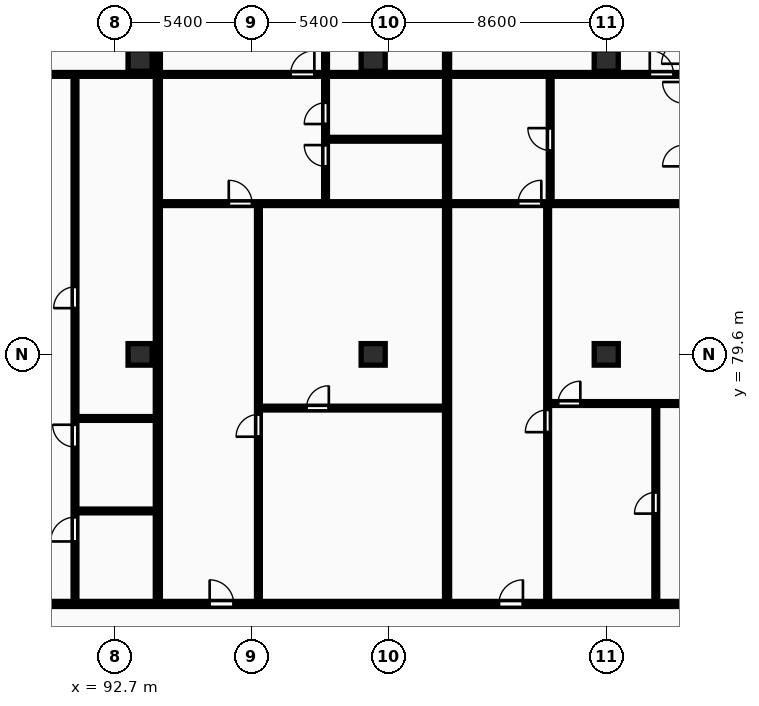
"""IFC4 building model, lengths in metres.
Left out: names, types, materials, properties, quantities, classifications, styles, units other than length and angle.
Written with IfcOpenShell. Run it as: python <this file> out.ifc"""

import sys

from ifc_helpers import new_model, si_unit, direction, frame, frame_2d, origin, origin_2d, place, context, subcontext, project, spatial, rectangle, extrude, element, fill, save


model = new_model("IFC4")
c1 = context("Model", 3, precision=1e-05, world=origin(), true_north=direction((0.0, 1.0)))
c2 = subcontext(c1, "Body", "Model", "MODEL_VIEW")
j1 = project(units=[si_unit("LENGTHUNIT", "METRE"), si_unit("PLANEANGLEUNIT", "RADIAN")], contexts=[c1])
p1 = place(None, origin())
s1 = spatial("IfcSite", under=j1, at=p1, CompositionType="ELEMENT")
p2 = place(p1, origin())
s2 = spatial("IfcBuilding", under=s1, at=p2, CompositionType="ELEMENT")
p3 = place(p2, frame((0.0, 0.0, 113.3)))
s3 = spatial("IfcBuildingStorey", under=s2, at=p3, CompositionType="ELEMENT", Elevation=113.3)
for number, where, z_axis, x_axis in (
    (1, (93.7, 79.6, 0.0), (0.0, 0.0, 1.0), (1.0, 0.0, 0.0)),
    (2, (93.7, 91.2, 0.0), (0.0, 0.0, 1.0), (1.0, 0.0, 0.0)),
    (3, (102.9, 79.6, 0.0), (0.0, 0.0, 1.0), (1.0, 0.0, 0.0)),
    (4, (102.9, 91.2, 0.0), (0.0, 0.0, 1.0), (1.0, 0.0, 0.0)),
    (5, (112.1, 79.6, 0.0), (0.0, 0.0, 1.0), (1.0, 0.0, 0.0)),
    (6, (112.1, 91.2, 0.0), (0.0, 0.0, 1.0), (1.0, 0.0, 0.0)),
):
    element("IfcColumn", number, at=place(p3, frame(where, z_axis=z_axis, x_axis=x_axis)), inside=s3, PredefinedType="COLUMN", context=c2, shape_type="SweptSolid", body=[
        extrude(rectangle(XDim=0.95, YDim=0.85, at=origin_2d()), origin(), (0.0, 0.0, 1.0), 3.25),
    ])
p4 = place(p3, frame((94.401, 69.83, 0.0), z_axis=(0.0, 0.0, 1.0), x_axis=(0.0, 1.0, 0.0)))
e7 = element("IfcWall", 7, at=p4, inside=s3, PredefinedType="PARTITIONING", context=c2, shape_type="SweptSolid", body=[
    extrude(rectangle(XDim=26.07, YDim=0.2, at=frame_2d((13.035, 0.0))), origin(), (0.0, 0.0, 1.0), 2.97),
])
for number, where, z_axis, x_axis in (
    (8, (91.191, 73.42, 0.0), (0.0, 0.0, 1.0), (1.0, 0.0, 0.0)),
    (9, (91.191, 77.07, 0.0), (0.0, 0.0, 1.0), (1.0, 0.0, 0.0)),
):
    element("IfcWall", number, at=place(p3, frame(where, z_axis=z_axis, x_axis=x_axis)), inside=s3, PredefinedType="PARTITIONING", context=c2, shape_type="SweptSolid", body=[
        extrude(rectangle(XDim=3.13, YDim=0.15, at=frame_2d((1.565, 0.0))), origin(), (0.0, 0.0, 1.0), 2.97),
    ])
p5 = place(p3, frame((91.131, 69.81, 0.0), z_axis=(0.0, 0.0, 1.0), x_axis=(0.0, 1.0, 0.0)))
e10 = element("IfcWall", 10, at=p5, inside=s3, PredefinedType="PARTITIONING", context=c2, shape_type="SweptSolid", body=[
    extrude(rectangle(XDim=20.78, YDim=0.15, at=frame_2d((10.39, 0.0))), origin(), (0.0, 0.0, 1.0), 2.97),
])
p6 = place(p5, frame((2.406, 0.0, 0.0)))
e11 = element("IfcOpeningElement", 11, at=p6, cuts=e10, PredefinedType="OPENING", context=c2, shape_type="SweptSolid", body=[
    extrude(rectangle(XDim=0.96, YDim=2.1, at=frame_2d((0.48, 1.05))), frame((0.0, 0.085, 0.0), z_axis=(0.0, -1.0, 0.0), x_axis=(1.0, 0.0, 0.0)), (0.0, 0.0, 1.0), 0.17),
])
p7 = place(p5, frame((6.133, 0.0, 0.0)))
e12 = element("IfcOpeningElement", 12, at=p7, cuts=e10, PredefinedType="OPENING", context=c2, shape_type="SweptSolid", body=[
    extrude(rectangle(XDim=0.88, YDim=2.06, at=frame_2d((0.44, 1.03))), frame((0.0, 0.085, 0.0), z_axis=(0.0, -1.0, 0.0), x_axis=(1.0, 0.0, 0.0)), (0.0, 0.0, 1.0), 0.17),
])
p8 = place(p5, frame((11.615, 0.0, 0.0)))
e13 = element("IfcOpeningElement", 13, at=p8, cuts=e10, PredefinedType="OPENING", context=c2, shape_type="SweptSolid", body=[
    extrude(rectangle(XDim=0.84, YDim=2.04, at=frame_2d((0.42, 1.02))), frame((0.0, 0.085, 0.0), z_axis=(0.0, -1.0, 0.0), x_axis=(1.0, 0.0, 0.0)), (0.0, 0.0, 1.0), 0.17),
])
p9 = place(p3, frame((75.405, 90.65, 0.0), z_axis=(0.0, 0.0, 1.0), x_axis=(1.0, 0.0, 0.0)))
e14 = element("IfcWall", 14, at=p9, inside=s3, PredefinedType="PARTITIONING", context=c2, shape_type="SweptSolid", body=[
    extrude(rectangle(XDim=18.916, YDim=0.15, at=frame_2d((9.458, 0.0))), origin(), (0.0, 0.0, 1.0), 2.97),
])
p10 = place(p9, frame((6.426, 0.0, 0.0)))
e15 = element("IfcOpeningElement", 15, at=p10, cuts=e14, PredefinedType="OPENING", context=c2, shape_type="SweptSolid", body=[
    extrude(rectangle(XDim=0.94, YDim=2.1, at=frame_2d((0.47, 1.05))), frame((0.0, 0.085, 0.0), z_axis=(0.0, -1.0, 0.0), x_axis=(1.0, 0.0, 0.0)), (0.0, 0.0, 1.0), 0.17),
])
p11 = place(p9, frame((10.856, 0.0, 0.0)))
e16 = element("IfcOpeningElement", 16, at=p11, cuts=e14, PredefinedType="OPENING", context=c2, shape_type="SweptSolid", body=[
    extrude(rectangle(XDim=0.94, YDim=2.1, at=frame_2d((0.47, 1.05))), frame((0.0, 0.085, 0.0), z_axis=(0.0, -1.0, 0.0), x_axis=(1.0, 0.0, 0.0)), (0.0, 0.0, 1.0), 0.17),
])
p12 = place(p3, frame((105.817, 69.83, 0.0), z_axis=(0.0, 0.0, 1.0), x_axis=(0.0, 1.0, 0.0)))
e17 = element("IfcWall", 17, at=p12, inside=s3, PredefinedType="PARTITIONING", context=c2, shape_type="SweptSolid", body=[
    extrude(rectangle(XDim=26.07, YDim=0.2, at=frame_2d((13.035, 0.0))), origin(), (0.0, 0.0, 1.0), 2.97),
])
p13 = place(p3, frame((98.431, 77.48, 0.0), z_axis=(0.0, 0.0, 1.0), x_axis=(1.0, 0.0, 0.0)))
e18 = element("IfcWall", 18, at=p13, inside=s3, PredefinedType="PARTITIONING", context=c2, shape_type="SweptSolid", body=[
    extrude(rectangle(XDim=7.306, YDim=0.15, at=frame_2d((3.653, 0.0))), origin(), (0.0, 0.0, 1.0), 2.97),
])
p14 = place(p13, frame((1.839, 0.0, 0.0)))
e19 = element("IfcOpeningElement", 19, at=p14, cuts=e18, PredefinedType="OPENING", context=c2, shape_type="SweptSolid", body=[
    extrude(rectangle(XDim=0.88, YDim=2.06, at=frame_2d((0.44, 1.03))), frame((0.0, 0.085, 0.0), z_axis=(0.0, -1.0, 0.0), x_axis=(1.0, 0.0, 0.0)), (0.0, 0.0, 1.0), 0.17),
])
p15 = place(p3, frame((98.371, 69.81, 0.0), z_axis=(0.0, 0.0, 1.0), x_axis=(0.0, 1.0, 0.0)))
e20 = element("IfcWall", 20, at=p15, inside=s3, PredefinedType="PARTITIONING", context=c2, shape_type="SweptSolid", body=[
    extrude(rectangle(XDim=15.7, YDim=0.15, at=frame_2d((7.85, 0.0))), origin(), (0.0, 0.0, 1.0), 2.97),
])
p16 = place(p15, frame((6.54, 0.0, 0.0)))
e21 = element("IfcOpeningElement", 21, at=p16, cuts=e20, PredefinedType="OPENING", context=c2, shape_type="SweptSolid", body=[
    extrude(rectangle(XDim=0.88, YDim=2.06, at=frame_2d((0.44, 1.03))), frame((0.0, 0.085, 0.0), z_axis=(0.0, -1.0, 0.0), x_axis=(1.0, 0.0, 0.0)), (0.0, 0.0, 1.0), 0.17),
])
p17 = place(p3, frame((101.08, 88.09, 0.0), z_axis=(0.0, 0.0, 1.0), x_axis=(1.0, 0.0, 0.0)))
e22 = element("IfcWall", 22, at=p17, inside=s3, PredefinedType="PARTITIONING", context=c2, shape_type="SweptSolid", body=[
    extrude(rectangle(XDim=4.656, YDim=0.15, at=frame_2d((2.328, 0.0))), origin(), (0.0, 0.0, 1.0), 2.97),
])
p18 = place(p3, frame((101.02, 85.59, 0.0), z_axis=(0.0, 0.0, 1.0), x_axis=(0.0, 1.0, 0.0)))
e23 = element("IfcWall", 23, at=p18, inside=s3, PredefinedType="PARTITIONING", context=c2, shape_type="SweptSolid", body=[
    extrude(rectangle(XDim=10.31, YDim=0.15, at=frame_2d((5.155, 0.0))), origin(), (0.0, 0.0, 1.0), 2.97),
])
p19 = place(p18, frame((1.43, 0.0, 0.0)))
e24 = element("IfcOpeningElement", 24, at=p19, cuts=e23, PredefinedType="OPENING", context=c2, shape_type="SweptSolid", body=[
    extrude(rectangle(XDim=0.84, YDim=2.04, at=frame_2d((0.42, 1.02))), frame((0.0, 0.085, 0.0), z_axis=(0.0, -1.0, 0.0), x_axis=(1.0, 0.0, 0.0)), (0.0, 0.0, 1.0), 0.17),
])
p20 = place(p18, frame((3.102, 0.0, 0.0)))
e25 = element("IfcOpeningElement", 25, at=p20, cuts=e23, PredefinedType="OPENING", context=c2, shape_type="SweptSolid", body=[
    extrude(rectangle(XDim=0.84, YDim=2.04, at=frame_2d((0.42, 1.02))), frame((0.0, 0.085, 0.0), z_axis=(0.0, -1.0, 0.0), x_axis=(1.0, 0.0, 0.0)), (0.0, 0.0, 1.0), 0.17),
])
p21 = place(p18, frame((7.29, 0.0, 0.0)))
e26 = element("IfcOpeningElement", 26, at=p21, cuts=e23, PredefinedType="OPENING", context=c2, shape_type="SweptSolid", body=[
    extrude(rectangle(XDim=0.88, YDim=2.06, at=frame_2d((0.44, 1.03))), frame((0.0, 0.085, 0.0), z_axis=(0.0, -1.0, 0.0), x_axis=(1.0, 0.0, 0.0)), (0.0, 0.0, 1.0), 0.17),
])
p22 = place(p3, frame((94.481, 85.55, 0.0), z_axis=(0.0, 0.0, 1.0), x_axis=(1.0, 0.0, 0.0)))
e27 = element("IfcWall", 27, at=p22, inside=s3, PredefinedType="PARTITIONING", context=c2, shape_type="SweptSolid", body=[
    extrude(rectangle(XDim=11.256, YDim=0.15, at=frame_2d((5.628, 0.0))), origin(), (0.0, 0.0, 1.0), 2.97),
])
p23 = place(p22, frame((2.72, 0.0, 0.0)))
e28 = element("IfcOpeningElement", 28, at=p23, cuts=e27, PredefinedType="OPENING", context=c2, shape_type="SweptSolid", body=[
    extrude(rectangle(XDim=0.92, YDim=2.08, at=frame_2d((0.46, 1.04))), frame((0.0, 0.085, 0.0), z_axis=(0.0, -1.0, 0.0), x_axis=(1.0, 0.0, 0.0)), (0.0, 0.0, 1.0), 0.17),
])
p24 = place(p3, frame((94.481, 90.65, 0.0), z_axis=(0.0, 0.0, 1.0), x_axis=(1.0, 0.0, 0.0)))
e29 = element("IfcWall", 29, at=p24, inside=s3, PredefinedType="PARTITIONING", context=c2, shape_type="SweptSolid", body=[
    extrude(rectangle(XDim=11.256, YDim=0.15, at=frame_2d((5.628, 0.0))), origin(), (0.0, 0.0, 1.0), 2.97),
])
p25 = place(p24, frame((5.158, 0.0, 0.0)))
e30 = element("IfcOpeningElement", 30, at=p25, cuts=e29, PredefinedType="OPENING", context=c2, shape_type="SweptSolid", body=[
    extrude(rectangle(XDim=0.94, YDim=2.1, at=frame_2d((0.47, 1.05))), frame((0.0, 0.085, 0.0), z_axis=(0.0, -1.0, 0.0), x_axis=(1.0, 0.0, 0.0)), (0.0, 0.0, 1.0), 0.17),
])
p26 = place(p3, frame((114.055, 69.81, 0.0), z_axis=(0.0, 0.0, 1.0), x_axis=(0.0, 1.0, 0.0)))
e31 = element("IfcWall", 31, at=p26, inside=s3, PredefinedType="PARTITIONING", context=c2, shape_type="SweptSolid", body=[
    extrude(rectangle(XDim=7.85, YDim=0.15, at=frame_2d((3.925, 0.0))), origin(), (0.0, 0.0, 1.0), 2.97),
])
p27 = place(p26, frame((3.505, 0.0, 0.0)))
e32 = element("IfcOpeningElement", 32, at=p27, cuts=e31, PredefinedType="OPENING", context=c2, shape_type="SweptSolid", body=[
    extrude(rectangle(XDim=0.84, YDim=2.04, at=frame_2d((0.42, 1.02))), frame((0.0, 0.085, 0.0), z_axis=(0.0, -1.0, 0.0), x_axis=(1.0, 0.0, 0.0)), (0.0, 0.0, 1.0), 0.17),
])
p28 = place(p3, frame((109.847, 77.66, 0.0), z_axis=(0.0, 0.0, 1.0), x_axis=(1.0, 0.0, 0.0)))
e33 = element("IfcWall", 33, at=p28, inside=s3, PredefinedType="PARTITIONING", context=c2, shape_type="SweptSolid", body=[
    extrude(rectangle(XDim=8.657, YDim=0.15, at=frame_2d((4.329, 0.0))), origin(), (0.0, 0.0, 1.0), 2.97),
])
p29 = place(p28, frame((0.35, 0.0, 0.0)))
e34 = element("IfcOpeningElement", 34, at=p29, cuts=e33, PredefinedType="OPENING", context=c2, shape_type="SweptSolid", body=[
    extrude(rectangle(XDim=0.88, YDim=2.06, at=frame_2d((0.44, 1.03))), frame((0.0, 0.085, 0.0), z_axis=(0.0, -1.0, 0.0), x_axis=(1.0, 0.0, 0.0)), (0.0, 0.0, 1.0), 0.17),
])
p30 = place(p3, frame((109.787, 69.81, 0.0), z_axis=(0.0, 0.0, 1.0), x_axis=(0.0, 1.0, 0.0)))
e35 = element("IfcWall", 35, at=p30, inside=s3, PredefinedType="PARTITIONING", context=c2, shape_type="SweptSolid", body=[
    extrude(rectangle(XDim=15.7, YDim=0.15, at=frame_2d((7.85, 0.0))), origin(), (0.0, 0.0, 1.0), 2.97),
])
p31 = place(p30, frame((6.72, 0.0, 0.0)))
e36 = element("IfcOpeningElement", 36, at=p31, cuts=e35, PredefinedType="OPENING", context=c2, shape_type="SweptSolid", body=[
    extrude(rectangle(XDim=0.88, YDim=2.06, at=frame_2d((0.44, 1.03))), frame((0.0, 0.085, 0.0), z_axis=(0.0, -1.0, 0.0), x_axis=(1.0, 0.0, 0.0)), (0.0, 0.0, 1.0), 0.17),
])
p32 = place(p3, frame((109.887, 85.59, 0.0), z_axis=(0.0, 0.0, 1.0), x_axis=(0.0, 1.0, 0.0)))
e37 = element("IfcWall", 37, at=p32, inside=s3, PredefinedType="PARTITIONING", context=c2, shape_type="SweptSolid", body=[
    extrude(rectangle(XDim=5.0, YDim=0.15, at=frame_2d((2.5, 0.0))), origin(), (0.0, 0.0, 1.0), 2.97),
])
p33 = place(p32, frame((2.06, 0.0, 0.0)))
e38 = element("IfcOpeningElement", 38, at=p33, cuts=e37, PredefinedType="OPENING", context=c2, shape_type="SweptSolid", body=[
    extrude(rectangle(XDim=0.88, YDim=2.06, at=frame_2d((0.44, 1.03))), frame((0.0, 0.085, 0.0), z_axis=(0.0, -1.0, 0.0), x_axis=(1.0, 0.0, 0.0)), (0.0, 0.0, 1.0), 0.17),
])
p34 = place(p3, frame((105.896, 85.55, 0.0), z_axis=(0.0, 0.0, 1.0), x_axis=(1.0, 0.0, 0.0)))
e39 = element("IfcWall", 39, at=p34, inside=s3, PredefinedType="PARTITIONING", context=c2, shape_type="SweptSolid", body=[
    extrude(rectangle(XDim=12.607, YDim=0.15, at=frame_2d((6.304, 0.0))), origin(), (0.0, 0.0, 1.0), 2.97),
])
p35 = place(p34, frame((2.72, 0.0, 0.0)))
e40 = element("IfcOpeningElement", 40, at=p35, cuts=e39, PredefinedType="OPENING", context=c2, shape_type="SweptSolid", body=[
    extrude(rectangle(XDim=0.92, YDim=2.08, at=frame_2d((0.46, 1.04))), frame((0.0, 0.085, 0.0), z_axis=(0.0, -1.0, 0.0), x_axis=(1.0, 0.0, 0.0)), (0.0, 0.0, 1.0), 0.17),
])
p36 = place(p3, frame((105.896, 90.65, 0.0), z_axis=(0.0, 0.0, 1.0), x_axis=(1.0, 0.0, 0.0)))
e41 = element("IfcWall", 41, at=p36, inside=s3, PredefinedType="PARTITIONING", context=c2, shape_type="SweptSolid", body=[
    extrude(rectangle(XDim=12.607, YDim=0.15, at=frame_2d((6.304, 0.0))), origin(), (0.0, 0.0, 1.0), 2.97),
])
p37 = place(p36, frame((7.921, 0.0, 0.0)))
e42 = element("IfcOpeningElement", 42, at=p37, cuts=e41, PredefinedType="OPENING", context=c2, shape_type="SweptSolid", body=[
    extrude(rectangle(XDim=0.94, YDim=2.1, at=frame_2d((0.47, 1.05))), frame((0.0, 0.085, 0.0), z_axis=(0.0, -1.0, 0.0), x_axis=(1.0, 0.0, 0.0)), (0.0, 0.0, 1.0), 0.17),
])
p38 = place(p3, frame((57.6, 69.75, 0.0), z_axis=(0.0, 0.0, 1.0), x_axis=(1.0, 0.0, 0.0)))
e43 = element("IfcWall", 43, at=p38, inside=s3, PredefinedType="PARTITIONING", context=c2, shape_type="SweptSolid", body=[
    extrude(rectangle(XDim=73.0, YDim=0.2, at=frame_2d((36.5, 0.0))), origin(), (0.0, 0.0, 1.0), 2.97),
])
p39 = place(p38, frame((7.172, 0.0, 0.0)))
e44 = element("IfcOpeningElement", 44, at=p39, cuts=e43, PredefinedType="OPENING", context=c2, shape_type="SweptSolid", body=[
    extrude(rectangle(XDim=1.22, YDim=2.18, at=frame_2d((0.61, 1.09))), frame((0.0, 0.11, 0.0), z_axis=(0.0, -1.0, 0.0), x_axis=(1.0, 0.0, 0.0)), (0.0, 0.0, 1.0), 0.22),
])
p40 = place(p38, frame((23.96, 0.0, 0.0)))
e45 = element("IfcOpeningElement", 45, at=p40, cuts=e43, PredefinedType="OPENING", context=c2, shape_type="SweptSolid", body=[
    extrude(rectangle(XDim=1.22, YDim=2.18, at=frame_2d((0.61, 1.09))), frame((0.0, 0.11, 0.0), z_axis=(0.0, -1.0, 0.0), x_axis=(1.0, 0.0, 0.0)), (0.0, 0.0, 1.0), 0.22),
])
p41 = place(p38, frame((38.846, 0.0, 0.0)))
e46 = element("IfcOpeningElement", 46, at=p41, cuts=e43, PredefinedType="OPENING", context=c2, shape_type="SweptSolid", body=[
    extrude(rectangle(XDim=0.95, YDim=2.15, at=frame_2d((0.475, 1.075))), frame((0.0, 0.11, 0.0), z_axis=(0.0, -1.0, 0.0), x_axis=(1.0, 0.0, 0.0)), (0.0, 0.0, 1.0), 0.22),
])
p42 = place(p38, frame((50.262, 0.0, 0.0)))
e47 = element("IfcOpeningElement", 47, at=p42, cuts=e43, PredefinedType="OPENING", context=c2, shape_type="SweptSolid", body=[
    extrude(rectangle(XDim=0.95, YDim=2.15, at=frame_2d((0.475, 1.075))), frame((0.0, 0.11, 0.0), z_axis=(0.0, -1.0, 0.0), x_axis=(1.0, 0.0, 0.0)), (0.0, 0.0, 1.0), 0.22),
])
p43 = place(p38, frame((63.754, 0.0, 0.0)))
e48 = element("IfcOpeningElement", 48, at=p43, cuts=e43, PredefinedType="OPENING", context=c2, shape_type="SweptSolid", body=[
    extrude(rectangle(XDim=0.95, YDim=2.15, at=frame_2d((0.475, 1.075))), frame((0.0, 0.11, 0.0), z_axis=(0.0, -1.0, 0.0), x_axis=(1.0, 0.0, 0.0)), (0.0, 0.0, 1.0), 0.22),
])
p44 = place(p6, origin())
e49 = element("IfcDoor", 49, at=p44, inside=s3, OperationType="SINGLE_SWING_LEFT", PredefinedType="DOOR", context=c2, shape_type="SweptSolid", body=[
    extrude(rectangle(XDim=0.96, YDim=2.1, at=frame_2d((0.48, 1.05))), frame((0.0, 0.025, 0.0), z_axis=(0.0, -1.0, 0.0), x_axis=(1.0, 0.0, 0.0)), (0.0, 0.0, 1.0), 0.05),
])
fill(e11, e49)
p45 = place(p7, origin())
e50 = element("IfcDoor", 50, at=p45, inside=s3, OperationType="SINGLE_SWING_RIGHT", PredefinedType="DOOR", context=c2, shape_type="SweptSolid", body=[
    extrude(rectangle(XDim=0.88, YDim=2.06, at=frame_2d((0.44, 1.03))), frame((0.0, 0.025, 0.0), z_axis=(0.0, -1.0, 0.0), x_axis=(1.0, 0.0, 0.0)), (0.0, 0.0, 1.0), 0.05),
])
fill(e12, e50)
p46 = place(p8, origin())
e51 = element("IfcDoor", 51, at=p46, inside=s3, OperationType="SINGLE_SWING_LEFT", PredefinedType="DOOR", context=c2, shape_type="SweptSolid", body=[
    extrude(rectangle(XDim=0.84, YDim=2.04, at=frame_2d((0.42, 1.02))), frame((0.0, 0.025, 0.0), z_axis=(0.0, -1.0, 0.0), x_axis=(1.0, 0.0, 0.0)), (0.0, 0.0, 1.0), 0.05),
])
fill(e13, e51)
p47 = place(p14, origin())
e52 = element("IfcDoor", 52, at=p47, inside=s3, OperationType="SINGLE_SWING_RIGHT", PredefinedType="DOOR", context=c2, shape_type="SweptSolid", body=[
    extrude(rectangle(XDim=0.88, YDim=2.06, at=frame_2d((0.44, 1.03))), frame((0.0, 0.025, 0.0), z_axis=(0.0, -1.0, 0.0), x_axis=(1.0, 0.0, 0.0)), (0.0, 0.0, 1.0), 0.05),
])
fill(e19, e52)
p48 = place(p16, origin())
e53 = element("IfcDoor", 53, at=p48, inside=s3, OperationType="SINGLE_SWING_LEFT", PredefinedType="DOOR", context=c2, shape_type="SweptSolid", body=[
    extrude(rectangle(XDim=0.88, YDim=2.06, at=frame_2d((0.44, 1.03))), frame((0.0, 0.025, 0.0), z_axis=(0.0, -1.0, 0.0), x_axis=(1.0, 0.0, 0.0)), (0.0, 0.0, 1.0), 0.05),
])
fill(e21, e53)
p49 = place(p19, origin())
e54 = element("IfcDoor", 54, at=p49, inside=s3, OperationType="SINGLE_SWING_RIGHT", PredefinedType="DOOR", context=c2, shape_type="SweptSolid", body=[
    extrude(rectangle(XDim=0.84, YDim=2.04, at=frame_2d((0.42, 1.02))), frame((0.0, 0.025, 0.0), z_axis=(0.0, -1.0, 0.0), x_axis=(1.0, 0.0, 0.0)), (0.0, 0.0, 1.0), 0.05),
])
fill(e24, e54)
p50 = place(p20, origin())
e55 = element("IfcDoor", 55, at=p50, inside=s3, OperationType="SINGLE_SWING_LEFT", PredefinedType="DOOR", context=c2, shape_type="SweptSolid", body=[
    extrude(rectangle(XDim=0.84, YDim=2.04, at=frame_2d((0.42, 1.02))), frame((0.0, 0.025, 0.0), z_axis=(0.0, -1.0, 0.0), x_axis=(1.0, 0.0, 0.0)), (0.0, 0.0, 1.0), 0.05),
])
fill(e25, e55)
p51 = place(p23, origin())
e56 = element("IfcDoor", 56, at=p51, inside=s3, OperationType="SINGLE_SWING_LEFT", PredefinedType="DOOR", context=c2, shape_type="SweptSolid", body=[
    extrude(rectangle(XDim=0.92, YDim=2.08, at=frame_2d((0.46, 1.04))), frame((0.0, 0.025, 0.0), z_axis=(0.0, -1.0, 0.0), x_axis=(1.0, 0.0, 0.0)), (0.0, 0.0, 1.0), 0.05),
])
fill(e28, e56)
p52 = place(p25, origin())
e57 = element("IfcDoor", 57, at=p52, inside=s3, OperationType="SINGLE_SWING_RIGHT", PredefinedType="DOOR", context=c2, shape_type="SweptSolid", body=[
    extrude(rectangle(XDim=0.94, YDim=2.1, at=frame_2d((0.47, 1.05))), frame((0.0, 0.025, 0.0), z_axis=(0.0, -1.0, 0.0), x_axis=(1.0, 0.0, 0.0)), (0.0, 0.0, 1.0), 0.05),
])
fill(e30, e57)
p53 = place(p27, origin())
e58 = element("IfcDoor", 58, at=p53, inside=s3, OperationType="SINGLE_SWING_LEFT", PredefinedType="DOOR", context=c2, shape_type="SweptSolid", body=[
    extrude(rectangle(XDim=0.84, YDim=2.04, at=frame_2d((0.42, 1.02))), frame((0.0, 0.025, 0.0), z_axis=(0.0, -1.0, 0.0), x_axis=(1.0, 0.0, 0.0)), (0.0, 0.0, 1.0), 0.05),
])
fill(e32, e58)
p54 = place(p29, origin())
e59 = element("IfcDoor", 59, at=p54, inside=s3, OperationType="SINGLE_SWING_RIGHT", PredefinedType="DOOR", context=c2, shape_type="SweptSolid", body=[
    extrude(rectangle(XDim=0.88, YDim=2.06, at=frame_2d((0.44, 1.03))), frame((0.0, 0.025, 0.0), z_axis=(0.0, -1.0, 0.0), x_axis=(1.0, 0.0, 0.0)), (0.0, 0.0, 1.0), 0.05),
])
fill(e34, e59)
p55 = place(p31, origin())
e60 = element("IfcDoor", 60, at=p55, inside=s3, OperationType="SINGLE_SWING_LEFT", PredefinedType="DOOR", context=c2, shape_type="SweptSolid", body=[
    extrude(rectangle(XDim=0.88, YDim=2.06, at=frame_2d((0.44, 1.03))), frame((0.0, 0.025, 0.0), z_axis=(0.0, -1.0, 0.0), x_axis=(1.0, 0.0, 0.0)), (0.0, 0.0, 1.0), 0.05),
])
fill(e36, e60)
p56 = place(p33, origin())
e61 = element("IfcDoor", 61, at=p56, inside=s3, OperationType="SINGLE_SWING_RIGHT", PredefinedType="DOOR", context=c2, shape_type="SweptSolid", body=[
    extrude(rectangle(XDim=0.88, YDim=2.06, at=frame_2d((0.44, 1.03))), frame((0.0, 0.025, 0.0), z_axis=(0.0, -1.0, 0.0), x_axis=(1.0, 0.0, 0.0)), (0.0, 0.0, 1.0), 0.05),
])
fill(e38, e61)
p57 = place(p35, origin())
e62 = element("IfcDoor", 62, at=p57, inside=s3, OperationType="SINGLE_SWING_RIGHT", PredefinedType="DOOR", context=c2, shape_type="SweptSolid", body=[
    extrude(rectangle(XDim=0.92, YDim=2.08, at=frame_2d((0.46, 1.04))), frame((0.0, 0.025, 0.0), z_axis=(0.0, -1.0, 0.0), x_axis=(1.0, 0.0, 0.0)), (0.0, 0.0, 1.0), 0.05),
])
fill(e40, e62)
p58 = place(p37, origin())
e63 = element("IfcDoor", 63, at=p58, inside=s3, OperationType="SINGLE_SWING_LEFT", PredefinedType="DOOR", context=c2, shape_type="SweptSolid", body=[
    extrude(rectangle(XDim=0.94, YDim=2.1, at=frame_2d((0.47, 1.05))), frame((0.0, 0.025, 0.0), z_axis=(0.0, -1.0, 0.0), x_axis=(1.0, 0.0, 0.0)), (0.0, 0.0, 1.0), 0.05),
])
fill(e42, e63)
p59 = place(p41, origin())
e64 = element("IfcDoor", 64, at=p59, inside=s3, OperationType="SINGLE_SWING_LEFT", PredefinedType="DOOR", context=c2, shape_type="SweptSolid", body=[
    extrude(rectangle(XDim=0.95, YDim=2.15, at=frame_2d((0.475, 1.075))), frame((0.0, 0.025, 0.0), z_axis=(0.0, -1.0, 0.0), x_axis=(1.0, 0.0, 0.0)), (0.0, 0.0, 1.0), 0.05),
])
fill(e46, e64)
p60 = place(p42, origin())
e65 = element("IfcDoor", 65, at=p60, inside=s3, OperationType="SINGLE_SWING_RIGHT", PredefinedType="DOOR", context=c2, shape_type="SweptSolid", body=[
    extrude(rectangle(XDim=0.95, YDim=2.15, at=frame_2d((0.475, 1.075))), frame((0.0, 0.025, 0.0), z_axis=(0.0, -1.0, 0.0), x_axis=(1.0, 0.0, 0.0)), (0.0, 0.0, 1.0), 0.05),
])
fill(e47, e65)
save(model, sys.argv[1])
